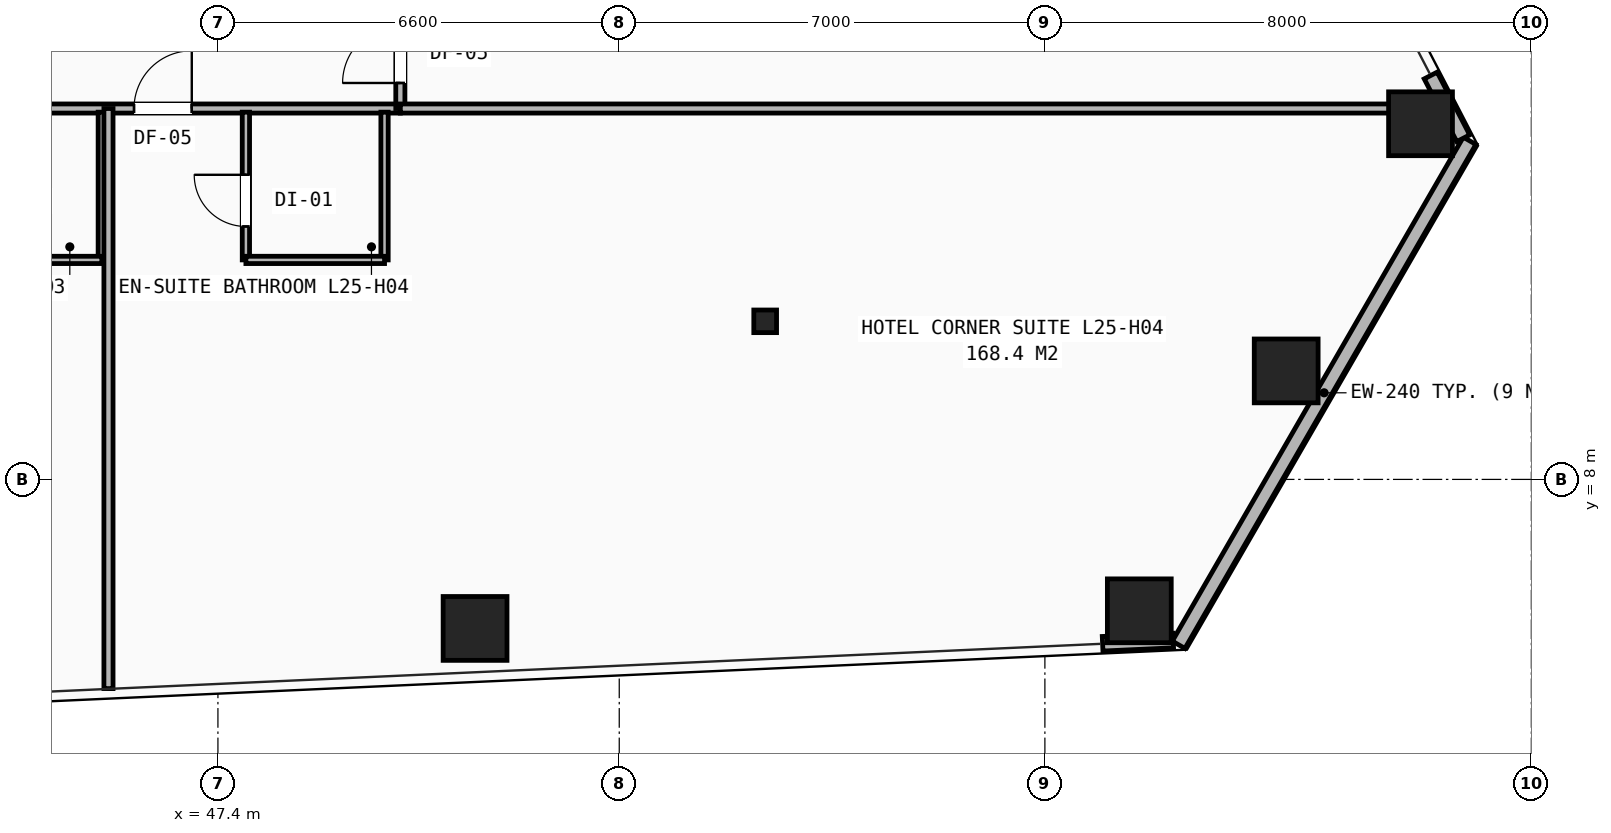
"""IFC4 building model, lengths in metres.
Left out: names, types, materials, properties, quantities, classifications, styles, units other than length and angle.
Written with IfcOpenShell. Run it as: python <this file> out.ifc"""

import sys

from ifc_helpers import new_model, si_unit, direction, frame, frame_2d, origin, origin_2d, place, context, subcontext, project, spatial, rectangle, hollow_rectangle, i_section, extrude, element, fill, save


model = new_model("IFC4")
c1 = context("Model", 3, precision=1e-05, world=origin(), true_north=direction((0.0, 1.0)))
c2 = subcontext(c1, "Body", "Model", "MODEL_VIEW")
j1 = project(units=[si_unit("LENGTHUNIT", "METRE"), si_unit("PLANEANGLEUNIT", "RADIAN")], contexts=[c1])
p1 = place(None, origin())
s1 = spatial("IfcSite", under=j1, at=p1, CompositionType="ELEMENT")
p2 = place(p1, origin())
s2 = spatial("IfcBuilding", under=s1, at=p2, CompositionType="ELEMENT")
p3 = place(p2, frame((0.0, 0.0, 89.4)))
s3 = spatial("IfcBuildingStorey", under=s2, at=p3, CompositionType="ELEMENT", Elevation=89.4)
p4 = place(p3, frame((56.4, 10.6, 0.0), z_axis=(0.0, 0.0, 1.0), x_axis=(1.0, 0.0, 0.0)))
e1 = element("IfcColumn", 1, at=p4, inside=s3, PredefinedType="COLUMN", context=c2, shape_type="SweptSolid", body=[
    extrude(i_section(OverallWidth=0.374, OverallDepth=0.372, WebThickness=0.016, FlangeThickness=0.026, at=origin_2d()), origin(), (0.0, 0.0, 1.0), 3.2),
])
for number, where, z_axis, x_axis in (
    (2, (51.629, 5.549, 0.0), (0.0, 0.0, 1.0), (1.0, 0.0, 0.0)),
    (3, (62.553, 5.839, 0.0), (0.0, 0.0, 1.0), (1.0, 0.0, 0.0)),
    (4, (64.968, 9.784, 0.0), (0.0, 0.0, 1.0), (1.0, 0.0, 0.0)),
    (5, (67.177, 13.849, 0.0), (0.0, 0.0, 1.0), (1.0, 0.0, 0.0)),
):
    element("IfcColumn", number, at=place(p3, frame(where, z_axis=z_axis, x_axis=x_axis)), inside=s3, PredefinedType="COLUMN", context=c2, shape_type="SweptSolid", body=[
        extrude(hollow_rectangle(XDim=1.05, YDim=1.05, WallThickness=0.07, at=origin_2d()), origin(), (0.0, 0.0, 1.0), 3.2),
    ])
p5 = place(p3, frame((61.949, 5.297, 0.0), z_axis=(0.0, 0.0, 1.0), x_axis=(0.998970704025, 0.045360031967, 0.0)))
e6 = element("IfcWall", 6, at=p5, inside=s3, PredefinedType="SHEAR", context=c2, shape_type="SweptSolid", body=[
    extrude(rectangle(XDim=1.163, YDim=0.24, at=frame_2d((0.581, 0.0))), origin(), (0.0, 0.0, 1.0), 2.253),
])
p6 = place(p3, frame((67.985, 13.569, 0.0), z_axis=(0.0, 0.0, 1.0), x_axis=(-0.499996243911, -0.866027572353, 0.0)))
e7 = element("IfcWall", 7, at=p6, inside=s3, PredefinedType="SHEAR", context=c2, shape_type="SweptSolid", body=[
    extrude(rectangle(XDim=9.571, YDim=0.24, at=frame_2d((4.786, 0.0))), origin(), (0.0, 0.0, 1.0), 2.253),
])
p7 = place(p3, frame((67.88, 13.611, 0.0), z_axis=(0.0, 0.0, 1.0), x_axis=(-0.460022833548, 0.887907085575, 0.0)))
e8 = element("IfcWall", 8, at=p7, inside=s3, PredefinedType="SHEAR", context=c2, shape_type="SweptSolid", body=[
    extrude(rectangle(XDim=1.162, YDim=0.24, at=frame_2d((0.581, 0.0))), origin(), (0.0, 0.0, 1.0), 2.253),
])
p8 = place(p3, frame((29.6, 14.1, 0.0), z_axis=(0.0, 0.0, 1.0), x_axis=(1.0, 0.0, 0.0)))
e9 = element("IfcWall", 9, at=p8, inside=s3, PredefinedType="PARTITIONING", context=c2, shape_type="SweptSolid", body=[
    extrude(rectangle(XDim=20.8, YDim=0.15, at=frame_2d((10.4, 0.0))), origin(), (0.0, 0.0, 1.0), 2.181),
])
p9 = place(p8, frame((0.57, 0.0, 0.0)))
e10 = element("IfcOpeningElement", 10, at=p9, cuts=e9, PredefinedType="OPENING", context=c2, shape_type="SweptSolid", body=[
    extrude(rectangle(XDim=0.95, YDim=2.1, at=frame_2d((0.475, 1.05))), frame((0.0, 0.085, 0.0), z_axis=(0.0, -1.0, 0.0), x_axis=(1.0, 0.0, 0.0)), (0.0, 0.0, 1.0), 0.17),
])
p10 = place(p8, frame((5.02, 0.0, 0.0)))
e11 = element("IfcOpeningElement", 11, at=p10, cuts=e9, PredefinedType="OPENING", context=c2, shape_type="SweptSolid", body=[
    extrude(rectangle(XDim=0.95, YDim=2.1, at=frame_2d((0.475, 1.05))), frame((0.0, 0.085, 0.0), z_axis=(0.0, -1.0, 0.0), x_axis=(1.0, 0.0, 0.0)), (0.0, 0.0, 1.0), 0.17),
])
p11 = place(p8, frame((10.62, 0.0, 0.0)))
e12 = element("IfcOpeningElement", 12, at=p11, cuts=e9, PredefinedType="OPENING", context=c2, shape_type="SweptSolid", body=[
    extrude(rectangle(XDim=0.95, YDim=2.1, at=frame_2d((0.475, 1.05))), frame((0.0, 0.085, 0.0), z_axis=(0.0, -1.0, 0.0), x_axis=(1.0, 0.0, 0.0)), (0.0, 0.0, 1.0), 0.17),
])
p12 = place(p8, frame((16.42, 0.0, 0.0)))
e13 = element("IfcOpeningElement", 13, at=p12, cuts=e9, PredefinedType="OPENING", context=c2, shape_type="SweptSolid", body=[
    extrude(rectangle(XDim=0.95, YDim=2.1, at=frame_2d((0.475, 1.05))), frame((0.0, 0.085, 0.0), z_axis=(0.0, -1.0, 0.0), x_axis=(1.0, 0.0, 0.0)), (0.0, 0.0, 1.0), 0.17),
])
p13 = place(p3, frame((50.4, 14.1, 0.0), z_axis=(0.0, 0.0, 1.0), x_axis=(0.0, 1.0, 0.0)))
e14 = element("IfcWall", 14, at=p13, inside=s3, PredefinedType="PARTITIONING", context=c2, shape_type="SweptSolid", body=[
    extrude(rectangle(XDim=21.9, YDim=0.15, at=frame_2d((10.95, 0.0))), origin(), (0.0, 0.0, 1.0), 2.181),
])
p14 = place(p13, frame((0.42, 0.0, 0.0)))
e15 = element("IfcOpeningElement", 15, at=p14, cuts=e14, PredefinedType="OPENING", context=c2, shape_type="SweptSolid", body=[
    extrude(rectangle(XDim=0.95, YDim=2.1, at=frame_2d((0.475, 1.05))), frame((0.0, 0.085, 0.0), z_axis=(0.0, -1.0, 0.0), x_axis=(1.0, 0.0, 0.0)), (0.0, 0.0, 1.0), 0.17),
])
p15 = place(p13, frame((4.72, 0.0, 0.0)))
e16 = element("IfcOpeningElement", 16, at=p15, cuts=e14, PredefinedType="OPENING", context=c2, shape_type="SweptSolid", body=[
    extrude(rectangle(XDim=0.95, YDim=2.1, at=frame_2d((0.475, 1.05))), frame((0.0, 0.085, 0.0), z_axis=(0.0, -1.0, 0.0), x_axis=(1.0, 0.0, 0.0)), (0.0, 0.0, 1.0), 0.17),
])
p16 = place(p13, frame((9.12, 0.0, 0.0)))
e17 = element("IfcOpeningElement", 17, at=p16, cuts=e14, PredefinedType="OPENING", context=c2, shape_type="SweptSolid", body=[
    extrude(rectangle(XDim=0.95, YDim=2.1, at=frame_2d((0.475, 1.05))), frame((0.0, 0.085, 0.0), z_axis=(0.0, -1.0, 0.0), x_axis=(1.0, 0.0, 0.0)), (0.0, 0.0, 1.0), 0.17),
])
p17 = place(p13, frame((13.72, 0.0, 0.0)))
e18 = element("IfcOpeningElement", 18, at=p17, cuts=e14, PredefinedType="OPENING", context=c2, shape_type="SweptSolid", body=[
    extrude(rectangle(XDim=0.95, YDim=2.1, at=frame_2d((0.475, 1.05))), frame((0.0, 0.085, 0.0), z_axis=(0.0, -1.0, 0.0), x_axis=(1.0, 0.0, 0.0)), (0.0, 0.0, 1.0), 0.17),
])
p18 = place(p13, frame((18.12, 0.0, 0.0)))
e19 = element("IfcOpeningElement", 19, at=p18, cuts=e14, PredefinedType="OPENING", context=c2, shape_type="SweptSolid", body=[
    extrude(rectangle(XDim=0.95, YDim=2.1, at=frame_2d((0.475, 1.05))), frame((0.0, 0.085, 0.0), z_axis=(0.0, -1.0, 0.0), x_axis=(1.0, 0.0, 0.0)), (0.0, 0.0, 1.0), 0.17),
])
p19 = place(p3, frame((45.49, 11.61, 0.0), z_axis=(0.0, 0.0, 1.0), x_axis=(0.0, 1.0, 0.0)))
e20 = element("IfcWall", 20, at=p19, inside=s3, PredefinedType="PARTITIONING", context=c2, shape_type="SweptSolid", body=[
    extrude(rectangle(XDim=2.43, YDim=0.12, at=frame_2d((1.215, 0.0))), origin(), (0.0, 0.0, 1.0), 2.97),
])
p20 = place(p3, frame((43.21, 11.61, 0.0), z_axis=(0.0, 0.0, 1.0), x_axis=(1.0, 0.0, 0.0)))
e21 = element("IfcWall", 21, at=p20, inside=s3, PredefinedType="PARTITIONING", context=c2, shape_type="SweptSolid", body=[
    extrude(rectangle(XDim=2.28, YDim=0.12, at=frame_2d((1.14, 0.0))), origin(), (0.0, 0.0, 1.0), 2.97),
])
p21 = place(p3, frame((45.6, 4.559, 0.0), z_axis=(0.0, 0.0, 1.0), x_axis=(0.0, 1.0, 0.0)))
e22 = element("IfcWall", 22, at=p21, inside=s3, PredefinedType="PARTITIONING", context=c2, shape_type="SweptSolid", body=[
    extrude(rectangle(XDim=9.541, YDim=0.15, at=frame_2d((4.771, 0.0))), origin(), (0.0, 0.0, 1.0), 2.258),
])
p22 = place(p3, frame((47.86, 11.61, 0.0), z_axis=(0.0, 0.0, 1.0), x_axis=(0.0, 1.0, 0.0)))
e23 = element("IfcWall", 23, at=p22, inside=s3, PredefinedType="PARTITIONING", context=c2, shape_type="SweptSolid", body=[
    extrude(rectangle(XDim=2.43, YDim=0.12, at=frame_2d((1.215, 0.0))), origin(), (0.0, 0.0, 1.0), 2.97),
])
p23 = place(p22, frame((0.55, 0.0, 0.0)))
e24 = element("IfcOpeningElement", 24, at=p23, cuts=e23, PredefinedType="OPENING", context=c2, shape_type="SweptSolid", body=[
    extrude(rectangle(XDim=0.85, YDim=2.05, at=frame_2d((0.425, 1.025))), frame((0.0, 0.07, 0.0), z_axis=(0.0, -1.0, 0.0), x_axis=(1.0, 0.0, 0.0)), (0.0, 0.0, 1.0), 0.14),
])
p24 = place(p3, frame((50.14, 11.61, 0.0), z_axis=(0.0, 0.0, 1.0), x_axis=(0.0, 1.0, 0.0)))
e25 = element("IfcWall", 25, at=p24, inside=s3, PredefinedType="PARTITIONING", context=c2, shape_type="SweptSolid", body=[
    extrude(rectangle(XDim=2.43, YDim=0.12, at=frame_2d((1.215, 0.0))), origin(), (0.0, 0.0, 1.0), 2.97),
])
p25 = place(p3, frame((47.86, 11.61, 0.0), z_axis=(0.0, 0.0, 1.0), x_axis=(1.0, 0.0, 0.0)))
e26 = element("IfcWall", 26, at=p25, inside=s3, PredefinedType="PARTITIONING", context=c2, shape_type="SweptSolid", body=[
    extrude(rectangle(XDim=2.28, YDim=0.12, at=frame_2d((1.14, 0.0))), origin(), (0.0, 0.0, 1.0), 2.97),
])
p26 = place(p3, frame((50.4, 14.1, 0.0), z_axis=(0.0, 0.0, 1.0), x_axis=(1.0, 0.0, 0.0)))
e27 = element("IfcWall", 27, at=p26, inside=s3, PredefinedType="PARTITIONING", context=c2, shape_type="SweptSolid", body=[
    extrude(rectangle(XDim=17.221, YDim=0.15, at=frame_2d((8.61, 0.0))), origin(), (0.0, 0.0, 1.0), 2.181),
])
p27 = place(p12, origin())
e28 = element("IfcDoor", 28, at=p27, inside=s3, OperationType="SINGLE_SWING_RIGHT", PredefinedType="DOOR", context=c2, shape_type="SweptSolid", body=[
    extrude(rectangle(XDim=0.95, YDim=2.1, at=frame_2d((0.475, 1.05))), frame((0.0, 0.025, 0.0), z_axis=(0.0, -1.0, 0.0), x_axis=(1.0, 0.0, 0.0)), (0.0, 0.0, 1.0), 0.05),
])
fill(e13, e28)
p28 = place(p23, origin())
e29 = element("IfcDoor", 29, at=p28, inside=s3, OperationType="SINGLE_SWING_RIGHT", PredefinedType="DOOR", context=c2, shape_type="SweptSolid", body=[
    extrude(rectangle(XDim=0.85, YDim=2.05, at=frame_2d((0.425, 1.025))), frame((0.0, 0.025, 0.0), z_axis=(0.0, -1.0, 0.0), x_axis=(1.0, 0.0, 0.0)), (0.0, 0.0, 1.0), 0.05),
])
fill(e24, e29)
p29 = place(p14, origin())
e30 = element("IfcDoor", 30, at=p29, inside=s3, OperationType="SINGLE_SWING_LEFT", PredefinedType="DOOR", context=c2, shape_type="SweptSolid", body=[
    extrude(rectangle(XDim=0.95, YDim=2.1, at=frame_2d((0.475, 1.05))), frame((0.0, 0.025, 0.0), z_axis=(0.0, -1.0, 0.0), x_axis=(1.0, 0.0, 0.0)), (0.0, 0.0, 1.0), 0.05),
])
fill(e15, e30)
save(model, sys.argv[1])
